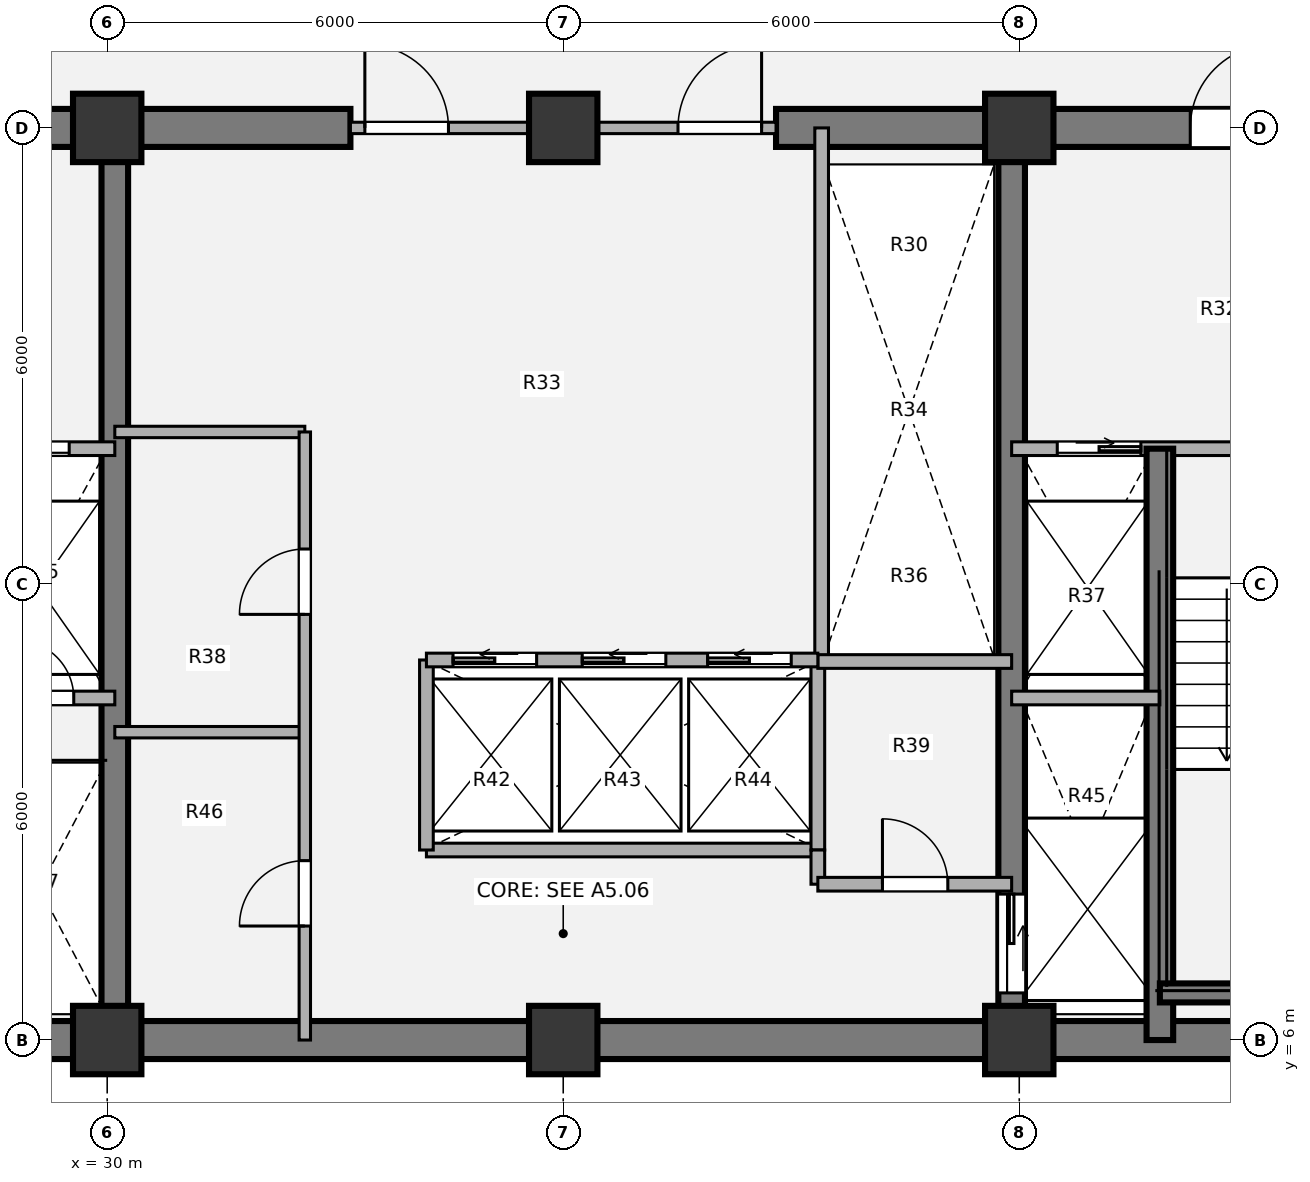
"""IFC4 building model, lengths in metres.
Left out: names, types, materials, properties, quantities, classifications, styles, units other than length and angle.
Written with IfcOpenShell. Run it as: python <this file> out.ifc"""

import sys

from ifc_helpers import new_model, si_unit, direction, frame, frame_2d, origin, origin_2d, place, context, subcontext, project, spatial, rectangle, extrude, source, transform, mapped, element, fill, save


model = new_model("IFC4")
c1 = context("Model", 3, precision=1e-05, world=origin(), true_north=direction((0.0, 1.0)))
c2 = subcontext(c1, "Body", "Model", "MODEL_VIEW")
j1 = project(units=[si_unit("LENGTHUNIT", "METRE"), si_unit("PLANEANGLEUNIT", "RADIAN")], contexts=[c1])
p1 = place(None, origin())
s1 = spatial("IfcSite", under=j1, at=p1, CompositionType="ELEMENT")
p2 = place(p1, origin())
s2 = spatial("IfcBuilding", under=s1, at=p2, CompositionType="ELEMENT")
p3 = place(p2, frame((0.0, 0.0, 135.18)))
s3 = spatial("IfcBuildingStorey", under=s2, at=p3, CompositionType="ELEMENT", Elevation=135.18)
m1 = source(origin(), c2, "Body", "SweptSolid", [
    extrude(rectangle(XDim=0.9, YDim=0.9, at=origin_2d()), origin(), (0.0, 0.0, 1.0), 3.78),
])
for number, where, z_axis, x_axis in (
    (1, (30.0, 6.0, 0.0), (0.0, 0.0, 1.0), (1.0, 0.0, 0.0)),
    (2, (36.0, 6.0, 0.0), (0.0, 0.0, 1.0), (1.0, 0.0, 0.0)),
    (3, (42.0, 6.0, 0.0), (0.0, 0.0, 1.0), (1.0, 0.0, 0.0)),
    (4, (30.0, 18.0, 0.0), (0.0, 0.0, 1.0), (1.0, 0.0, 0.0)),
    (5, (36.0, 18.0, 0.0), (0.0, 0.0, 1.0), (1.0, 0.0, 0.0)),
    (6, (42.0, 18.0, 0.0), (0.0, 0.0, 1.0), (1.0, 0.0, 0.0)),
):
    element("IfcColumn", number, at=place(p3, frame(where, z_axis=z_axis, x_axis=x_axis)), inside=s3, PredefinedType="COLUMN", context=c2, shape_type="MappedRepresentation", body=[
        mapped(m1, transform((0.0, 0.0, 0.0), x_axis=(1.0, 0.0, 0.0), y_axis=(0.0, 1.0, 0.0), z_axis=(0.0, 0.0, 1.0), scale=1.0)),
    ])
p4 = place(p3, frame((48.25, 6.0, 0.0), z_axis=(0.0, 0.0, 1.0), x_axis=(-1.0, 0.0, 0.0)))
e7 = element("IfcWall", 7, at=p4, inside=s3, PredefinedType="SHEAR", context=c2, shape_type="SweptSolid", body=[
    extrude(rectangle(XDim=24.5, YDim=0.5, at=frame_2d((12.25, 0.0))), origin(), (0.0, 0.0, 1.0), 3.78),
])
p5 = place(p3, frame((23.75, 18.0, 0.0), z_axis=(0.0, 0.0, 1.0), x_axis=(1.0, 0.0, 0.0)))
e8 = element("IfcWall", 8, at=p5, inside=s3, PredefinedType="SHEAR", context=c2, shape_type="SweptSolid", body=[
    extrude(rectangle(XDim=9.45, YDim=0.5, at=frame_2d((4.725, 0.0))), origin(), (0.0, 0.0, 1.0), 3.78),
])
p6 = place(p5, frame((2.95, 0.0, 0.0)))
e9 = element("IfcOpeningElement", 9, at=p6, cuts=e8, PredefinedType="OPENING", context=c2, shape_type="SweptSolid", body=[
    extrude(rectangle(XDim=1.1, YDim=2.1, at=origin_2d()), frame((0.55, 0.26, 1.05), z_axis=(0.0, -1.0, 0.0), x_axis=(1.0, 0.0, 0.0)), (0.0, 0.0, 1.0), 0.52),
])
p7 = place(p3, frame((38.8, 18.0, 0.0), z_axis=(0.0, 0.0, 1.0), x_axis=(1.0, 0.0, 0.0)))
e10 = element("IfcWall", 10, at=p7, inside=s3, PredefinedType="SHEAR", context=c2, shape_type="SweptSolid", body=[
    extrude(rectangle(XDim=9.45, YDim=0.5, at=frame_2d((4.725, 0.0))), origin(), (0.0, 0.0, 1.0), 3.78),
])
p8 = place(p7, frame((5.45, 0.0, 0.0)))
e11 = element("IfcOpeningElement", 11, at=p8, cuts=e10, PredefinedType="OPENING", context=c2, shape_type="SweptSolid", body=[
    extrude(rectangle(XDim=1.1, YDim=2.1, at=origin_2d()), frame((0.55, 0.26, 1.05), z_axis=(0.0, -1.0, 0.0), x_axis=(1.0, 0.0, 0.0)), (0.0, 0.0, 1.0), 0.52),
])
p9 = place(p3, frame((30.1, 6.0, 0.0), z_axis=(0.0, 0.0, 1.0), x_axis=(0.0, 1.0, 0.0)))
e12 = element("IfcWall", 12, at=p9, inside=s3, PredefinedType="SHEAR", context=c2, shape_type="SweptSolid", body=[
    extrude(rectangle(XDim=12.0, YDim=0.35, at=frame_2d((6.0, 0.0))), origin(), (0.0, 0.0, 1.0), 3.78),
])
p10 = place(p3, frame((41.9, 18.0, 0.0), z_axis=(0.0, 0.0, 1.0), x_axis=(0.0, -1.0, 0.0)))
e13 = element("IfcWall", 13, at=p10, inside=s3, PredefinedType="SHEAR", context=c2, shape_type="SweptSolid", body=[
    extrude(rectangle(XDim=12.0, YDim=0.35, at=frame_2d((6.0, 0.0))), origin(), (0.0, 0.0, 1.0), 3.78),
])
p11 = place(p10, frame((10.08, 0.0, 0.0)))
e14 = element("IfcOpeningElement", 14, at=p11, cuts=e13, PredefinedType="OPENING", context=c2, shape_type="SweptSolid", body=[
    extrude(rectangle(XDim=1.3, YDim=2.1, at=origin_2d()), frame((0.65, 0.185, 1.05), z_axis=(0.0, -1.0, 0.0), x_axis=(1.0, 0.0, 0.0)), (0.0, 0.0, 1.0), 0.37),
])
p12 = place(p3, frame((30.1, 14.0, 0.0), z_axis=(0.0, 0.0, 1.0), x_axis=(1.0, 0.0, 0.0)))
e15 = element("IfcWall", 15, at=p12, inside=s3, PredefinedType="PARTITIONING", context=c2, shape_type="SweptSolid", body=[
    extrude(rectangle(XDim=2.5, YDim=0.15, at=frame_2d((1.25, 0.0))), origin(), (0.0, 0.0, 1.0), 3.5),
])
p13 = place(p3, frame((34.2, 8.5, 0.0), z_axis=(0.0, 0.0, 1.0), x_axis=(1.0, 0.0, 0.0)))
e16 = element("IfcWall", 16, at=p13, inside=s3, PredefinedType="PARTITIONING", context=c2, shape_type="SweptSolid", body=[
    extrude(rectangle(XDim=5.15, YDim=0.18, at=frame_2d((2.575, 0.0))), origin(), (0.0, 0.0, 1.0), 3.5),
])
for number, where, z_axis, x_axis in (
    (17, (34.2, 8.5, 0.0), (0.0, 0.0, 1.0), (0.0, 1.0, 0.0)),
    (18, (39.35, 8.5, 0.0), (0.0, 0.0, 1.0), (0.0, 1.0, 0.0)),
):
    element("IfcWall", number, at=place(p3, frame(where, z_axis=z_axis, x_axis=x_axis)), inside=s3, PredefinedType="PARTITIONING", context=c2, shape_type="SweptSolid", body=[
        extrude(rectangle(XDim=2.5, YDim=0.18, at=frame_2d((1.25, 0.0))), origin(), (0.0, 0.0, 1.0), 3.5),
    ])
p14 = place(p3, frame((39.4, 11.0, 0.0), z_axis=(0.0, 0.0, 1.0), x_axis=(0.0, 1.0, 0.0)))
e19 = element("IfcWall", 19, at=p14, inside=s3, PredefinedType="PARTITIONING", context=c2, shape_type="SweptSolid", body=[
    extrude(rectangle(XDim=7.0, YDim=0.18, at=frame_2d((3.5, 0.0))), origin(), (0.0, 0.0, 1.0), 3.5),
])
p15 = place(p3, frame((30.1, 10.05, 0.0), z_axis=(0.0, 0.0, 1.0), x_axis=(1.0, 0.0, 0.0)))
e20 = element("IfcWall", 20, at=p15, inside=s3, PredefinedType="PARTITIONING", context=c2, shape_type="SweptSolid", body=[
    extrude(rectangle(XDim=2.5, YDim=0.15, at=frame_2d((1.25, 0.0))), origin(), (0.0, 0.0, 1.0), 3.5),
])
p16 = place(p3, frame((32.6, 6.0, 0.0), z_axis=(0.0, 0.0, 1.0), x_axis=(0.0, 1.0, 0.0)))
e21 = element("IfcWall", 21, at=p16, inside=s3, PredefinedType="PARTITIONING", context=c2, shape_type="SweptSolid", body=[
    extrude(rectangle(XDim=8.0, YDim=0.15, at=frame_2d((4.0, 0.0))), origin(), (0.0, 0.0, 1.0), 3.5),
])
p17 = place(p16, frame((1.5, 0.0, 0.0)))
e22 = element("IfcOpeningElement", 22, at=p17, cuts=e21, PredefinedType="OPENING", context=c2, shape_type="SweptSolid", body=[
    extrude(rectangle(XDim=0.86, YDim=2.1, at=origin_2d()), frame((0.43, 0.085, 1.05), z_axis=(0.0, -1.0, 0.0), x_axis=(1.0, 0.0, 0.0)), (0.0, 0.0, 1.0), 0.17),
])
p18 = place(p16, frame((5.6, 0.0, 0.0)))
e23 = element("IfcOpeningElement", 23, at=p18, cuts=e21, PredefinedType="OPENING", context=c2, shape_type="SweptSolid", body=[
    extrude(rectangle(XDim=0.86, YDim=2.1, at=origin_2d()), frame((0.43, 0.085, 1.05), z_axis=(0.0, -1.0, 0.0), x_axis=(1.0, 0.0, 0.0)), (0.0, 0.0, 1.0), 0.17),
])
p19 = place(p3, frame((39.35, 10.98, 0.0), z_axis=(0.0, 0.0, 1.0), x_axis=(1.0, 0.0, 0.0)))
e24 = element("IfcWall", 24, at=p19, inside=s3, PredefinedType="PARTITIONING", context=c2, shape_type="SweptSolid", body=[
    extrude(rectangle(XDim=2.55, YDim=0.18, at=frame_2d((1.275, 0.0))), origin(), (0.0, 0.0, 1.0), 3.5),
])
p20 = place(p3, frame((39.35, 8.05, 0.0), z_axis=(0.0, 0.0, 1.0), x_axis=(0.0, 1.0, 0.0)))
e25 = element("IfcWall", 25, at=p20, inside=s3, PredefinedType="PARTITIONING", context=c2, shape_type="SweptSolid", body=[
    extrude(rectangle(XDim=0.45, YDim=0.18, at=frame_2d((0.225, 0.0))), origin(), (0.0, 0.0, 1.0), 3.5),
])
p21 = place(p3, frame((39.35, 8.05, 0.0), z_axis=(0.0, 0.0, 1.0), x_axis=(1.0, 0.0, 0.0)))
e26 = element("IfcWall", 26, at=p21, inside=s3, PredefinedType="PARTITIONING", context=c2, shape_type="SweptSolid", body=[
    extrude(rectangle(XDim=2.55, YDim=0.18, at=frame_2d((1.275, 0.0))), origin(), (0.0, 0.0, 1.0), 3.5),
])
p22 = place(p21, frame((0.85, 0.0, 0.0)))
e27 = element("IfcOpeningElement", 27, at=p22, cuts=e26, PredefinedType="OPENING", context=c2, shape_type="SweptSolid", body=[
    extrude(rectangle(XDim=0.86, YDim=2.1, at=origin_2d()), frame((0.43, 0.1, 1.05), z_axis=(0.0, -1.0, 0.0), x_axis=(1.0, 0.0, 0.0)), (0.0, 0.0, 1.0), 0.2),
])
p23 = place(p3, frame((33.2, 18.0, 0.0), z_axis=(0.0, 0.0, 1.0), x_axis=(1.0, 0.0, 0.0)))
e28 = element("IfcWall", 28, at=p23, inside=s3, PredefinedType="PARTITIONING", context=c2, shape_type="SweptSolid", body=[
    extrude(rectangle(XDim=5.6, YDim=0.15, at=frame_2d((2.8, 0.0))), origin(), (0.0, 0.0, 1.0), 2.315),
])
p24 = place(p23, frame((0.19, 0.0, 0.0)))
e29 = element("IfcOpeningElement", 29, at=p24, cuts=e28, PredefinedType="OPENING", context=c2, shape_type="SweptSolid", body=[
    extrude(rectangle(XDim=1.1, YDim=2.1, at=origin_2d()), frame((0.55, 0.085, 1.05), z_axis=(0.0, -1.0, 0.0), x_axis=(1.0, 0.0, 0.0)), (0.0, 0.0, 1.0), 0.17),
])
p25 = place(p23, frame((4.31, 0.0, 0.0)))
e30 = element("IfcOpeningElement", 30, at=p25, cuts=e28, PredefinedType="OPENING", context=c2, shape_type="SweptSolid", body=[
    extrude(rectangle(XDim=1.1, YDim=2.1, at=origin_2d()), frame((0.55, 0.085, 1.05), z_axis=(0.0, -1.0, 0.0), x_axis=(1.0, 0.0, 0.0)), (0.0, 0.0, 1.0), 0.17),
])
p26 = place(p3, frame((24.0, 13.78, 0.0), z_axis=(0.0, 0.0, 1.0), x_axis=(1.0, 0.0, 0.0)))
e31 = element("IfcWall", 31, at=p26, inside=s3, PredefinedType="PARTITIONING", context=c2, shape_type="SweptSolid", body=[
    extrude(rectangle(XDim=6.1, YDim=0.18, at=frame_2d((3.05, 0.0))), origin(), (0.0, 0.0, 1.0), 3.5),
])
p27 = place(p26, frame((1.15, 0.0, 0.0)))
e32 = element("IfcOpeningElement", 32, at=p27, cuts=e31, PredefinedType="OPENING", context=c2, shape_type="SweptSolid", body=[
    extrude(rectangle(XDim=1.1, YDim=2.1, at=origin_2d()), frame((0.55, 0.1, 1.05), z_axis=(0.0, -1.0, 0.0), x_axis=(1.0, 0.0, 0.0)), (0.0, 0.0, 1.0), 0.2),
])
p28 = place(p26, frame((4.4, 0.0, 0.0)))
e33 = element("IfcOpeningElement", 33, at=p28, cuts=e31, PredefinedType="OPENING", context=c2, shape_type="SweptSolid", body=[
    extrude(rectangle(XDim=1.1, YDim=2.1, at=origin_2d()), frame((0.55, 0.1, 1.05), z_axis=(0.0, -1.0, 0.0), x_axis=(1.0, 0.0, 0.0)), (0.0, 0.0, 1.0), 0.2),
])
p29 = place(p3, frame((28.15, 10.5, 0.0), z_axis=(0.0, 0.0, 1.0), x_axis=(1.0, 0.0, 0.0)))
e34 = element("IfcWall", 34, at=p29, inside=s3, PredefinedType="PARTITIONING", context=c2, shape_type="SweptSolid", body=[
    extrude(rectangle(XDim=1.95, YDim=0.18, at=frame_2d((0.975, 0.0))), origin(), (0.0, 0.0, 1.0), 3.5),
])
p30 = place(p29, frame((0.65, 0.0, 0.0)))
e35 = element("IfcOpeningElement", 35, at=p30, cuts=e34, PredefinedType="OPENING", context=c2, shape_type="SweptSolid", body=[
    extrude(rectangle(XDim=0.76, YDim=2.05, at=origin_2d()), frame((0.38, 0.1, 1.025), z_axis=(0.0, -1.0, 0.0), x_axis=(1.0, 0.0, 0.0)), (0.0, 0.0, 1.0), 0.2),
])
p31 = place(p3, frame((41.9, 13.78, 0.0), z_axis=(0.0, 0.0, 1.0), x_axis=(1.0, 0.0, 0.0)))
e36 = element("IfcWall", 36, at=p31, inside=s3, PredefinedType="PARTITIONING", context=c2, shape_type="SweptSolid", body=[
    extrude(rectangle(XDim=6.1, YDim=0.18, at=frame_2d((3.05, 0.0))), origin(), (0.0, 0.0, 1.0), 3.5),
])
p32 = place(p31, frame((0.6, 0.0, 0.0)))
e37 = element("IfcOpeningElement", 37, at=p32, cuts=e36, PredefinedType="OPENING", context=c2, shape_type="SweptSolid", body=[
    extrude(rectangle(XDim=1.1, YDim=2.1, at=origin_2d()), frame((0.55, 0.1, 1.05), z_axis=(0.0, -1.0, 0.0), x_axis=(1.0, 0.0, 0.0)), (0.0, 0.0, 1.0), 0.2),
])
p33 = place(p31, frame((3.8, 0.0, 0.0)))
e38 = element("IfcOpeningElement", 38, at=p33, cuts=e36, PredefinedType="OPENING", context=c2, shape_type="SweptSolid", body=[
    extrude(rectangle(XDim=1.1, YDim=2.1, at=origin_2d()), frame((0.55, 0.1, 1.05), z_axis=(0.0, -1.0, 0.0), x_axis=(1.0, 0.0, 0.0)), (0.0, 0.0, 1.0), 0.2),
])
p34 = place(p3, frame((43.85, 6.0, 0.0), z_axis=(0.0, 0.0, 1.0), x_axis=(0.0, 1.0, 0.0)))
e39 = element("IfcWall", 39, at=p34, inside=s3, PredefinedType="SHEAR", context=c2, shape_type="SweptSolid", body=[
    extrude(rectangle(XDim=7.78, YDim=0.35, at=frame_2d((3.89, 0.0))), origin(), (0.0, 0.0, 1.0), 3.85),
])
p35 = place(p3, frame((43.85, 6.62, 0.0), z_axis=(0.0, 0.0, 1.0), x_axis=(1.0, 0.0, 0.0)))
e40 = element("IfcWall", 40, at=p35, inside=s3, PredefinedType="SHEAR", context=c2, shape_type="SweptSolid", body=[
    extrude(rectangle(XDim=3.57, YDim=0.25, at=frame_2d((1.785, 0.0))), origin(), (0.0, 0.0, 1.0), 3.85),
])
p36 = place(p3, frame((41.9, 10.5, 0.0), z_axis=(0.0, 0.0, 1.0), x_axis=(1.0, 0.0, 0.0)))
e41 = element("IfcWall", 41, at=p36, inside=s3, PredefinedType="PARTITIONING", context=c2, shape_type="SweptSolid", body=[
    extrude(rectangle(XDim=1.95, YDim=0.18, at=frame_2d((0.975, 0.0))), origin(), (0.0, 0.0, 1.0), 3.5),
])
p37 = place(p3, frame((34.2, 11.0, 0.0), z_axis=(0.0, 0.0, 1.0), x_axis=(1.0, 0.0, 0.0)))
e42 = element("IfcWall", 42, at=p37, inside=s3, PredefinedType="PARTITIONING", context=c2, shape_type="SweptSolid", body=[
    extrude(rectangle(XDim=5.15, YDim=0.18, at=frame_2d((2.575, 0.0))), origin(), (0.0, 0.0, 1.0), 3.5),
])
p38 = place(p37, frame((0.35, 0.0, 0.0)))
e43 = element("IfcOpeningElement", 43, at=p38, cuts=e42, PredefinedType="OPENING", context=c2, shape_type="SweptSolid", body=[
    extrude(rectangle(XDim=1.1, YDim=2.1, at=origin_2d()), frame((0.55, 0.1, 1.05), z_axis=(0.0, -1.0, 0.0), x_axis=(1.0, 0.0, 0.0)), (0.0, 0.0, 1.0), 0.2),
])
p39 = place(p37, frame((2.05, 0.0, 0.0)))
e44 = element("IfcOpeningElement", 44, at=p39, cuts=e42, PredefinedType="OPENING", context=c2, shape_type="SweptSolid", body=[
    extrude(rectangle(XDim=1.1, YDim=2.1, at=origin_2d()), frame((0.55, 0.1, 1.05), z_axis=(0.0, -1.0, 0.0), x_axis=(1.0, 0.0, 0.0)), (0.0, 0.0, 1.0), 0.2),
])
p40 = place(p37, frame((3.7, 0.0, 0.0)))
e45 = element("IfcOpeningElement", 45, at=p40, cuts=e42, PredefinedType="OPENING", context=c2, shape_type="SweptSolid", body=[
    extrude(rectangle(XDim=1.1, YDim=2.1, at=origin_2d()), frame((0.55, 0.1, 1.05), z_axis=(0.0, -1.0, 0.0), x_axis=(1.0, 0.0, 0.0)), (0.0, 0.0, 1.0), 0.2),
])
m2 = source(origin(), c2, "Body", "SweptSolid", [
    extrude(rectangle(XDim=0.86, YDim=2.1, at=origin_2d()), frame((0.43, 0.025, 1.05), z_axis=(0.0, -1.0, 0.0), x_axis=(1.0, 0.0, 0.0)), (0.0, 0.0, 1.0), 0.05),
])
p41 = place(p17, origin())
e46 = element("IfcDoor", 46, at=p41, inside=s3, OperationType="SINGLE_SWING_LEFT", PredefinedType="DOOR", context=c2, shape_type="MappedRepresentation", body=[
    mapped(m2, transform((0.0, 0.0, 0.0), x_axis=(1.0, 0.0, 0.0), y_axis=(0.0, 1.0, 0.0), z_axis=(0.0, 0.0, 1.0), scale=1.0)),
])
fill(e22, e46)
p42 = place(p18, origin())
e47 = element("IfcDoor", 47, at=p42, inside=s3, OperationType="SINGLE_SWING_LEFT", PredefinedType="DOOR", context=c2, shape_type="MappedRepresentation", body=[
    mapped(m2, transform((0.0, 0.0, 0.0), x_axis=(1.0, 0.0, 0.0), y_axis=(0.0, 1.0, 0.0), z_axis=(0.0, 0.0, 1.0), scale=1.0)),
])
fill(e23, e47)
p43 = place(p22, origin())
e48 = element("IfcDoor", 48, at=p43, inside=s3, OperationType="SINGLE_SWING_LEFT", PredefinedType="DOOR", context=c2, shape_type="MappedRepresentation", body=[
    mapped(m2, transform((0.0, 0.0, 0.0), x_axis=(1.0, 0.0, 0.0), y_axis=(0.0, 1.0, 0.0), z_axis=(0.0, 0.0, 1.0), scale=1.0)),
])
fill(e27, e48)
m3 = source(origin(), c2, "Body", "SweptSolid", [
    extrude(rectangle(XDim=1.1, YDim=2.1, at=origin_2d()), frame((0.55, 0.025, 1.05), z_axis=(0.0, -1.0, 0.0), x_axis=(1.0, 0.0, 0.0)), (0.0, 0.0, 1.0), 0.05),
])
p44 = place(p24, origin())
e49 = element("IfcDoor", 49, at=p44, inside=s3, OperationType="SINGLE_SWING_LEFT", PredefinedType="DOOR", context=c2, shape_type="MappedRepresentation", body=[
    mapped(m3, transform((0.0, 0.0, 0.0), x_axis=(1.0, 0.0, 0.0), y_axis=(0.0, 1.0, 0.0), z_axis=(0.0, 0.0, 1.0), scale=1.0)),
])
fill(e29, e49)
p45 = place(p25, origin())
e50 = element("IfcDoor", 50, at=p45, inside=s3, OperationType="SINGLE_SWING_RIGHT", PredefinedType="DOOR", context=c2, shape_type="MappedRepresentation", body=[
    mapped(m3, transform((0.0, 0.0, 0.0), x_axis=(1.0, 0.0, 0.0), y_axis=(0.0, 1.0, 0.0), z_axis=(0.0, 0.0, 1.0), scale=1.0)),
])
fill(e30, e50)
m4 = source(origin(), c2, "Body", "SweptSolid", [
    extrude(rectangle(XDim=1.1, YDim=2.1, at=origin_2d()), frame((0.55, 0.025, 1.05), z_axis=(0.0, -1.0, 0.0), x_axis=(1.0, 0.0, 0.0)), (0.0, 0.0, 1.0), 0.05),
])
p46 = place(p28, origin())
e51 = element("IfcDoor", 51, at=p46, inside=s3, OperationType="SLIDING_TO_LEFT", PredefinedType="DOOR", context=c2, shape_type="MappedRepresentation", body=[
    mapped(m4, transform((0.0, 0.0, 0.0), x_axis=(1.0, 0.0, 0.0), y_axis=(0.0, 1.0, 0.0), z_axis=(0.0, 0.0, 1.0), scale=1.0)),
])
fill(e33, e51)
m5 = source(origin(), c2, "Body", "SweptSolid", [
    extrude(rectangle(XDim=0.76, YDim=2.05, at=origin_2d()), frame((0.38, 0.025, 1.025), z_axis=(0.0, -1.0, 0.0), x_axis=(1.0, 0.0, 0.0)), (0.0, 0.0, 1.0), 0.05),
])
p47 = place(p30, origin())
e52 = element("IfcDoor", 52, at=p47, inside=s3, OperationType="SINGLE_SWING_LEFT", PredefinedType="DOOR", context=c2, shape_type="MappedRepresentation", body=[
    mapped(m5, transform((0.0, 0.0, 0.0), x_axis=(1.0, 0.0, 0.0), y_axis=(0.0, 1.0, 0.0), z_axis=(0.0, 0.0, 1.0), scale=1.0)),
])
fill(e35, e52)
p48 = place(p32, origin())
e53 = element("IfcDoor", 53, at=p48, inside=s3, OperationType="SLIDING_TO_RIGHT", PredefinedType="DOOR", context=c2, shape_type="MappedRepresentation", body=[
    mapped(m4, transform((0.0, 0.0, 0.0), x_axis=(1.0, 0.0, 0.0), y_axis=(0.0, 1.0, 0.0), z_axis=(0.0, 0.0, 1.0), scale=1.0)),
])
fill(e37, e53)
m6 = source(origin(), c2, "Body", "SweptSolid", [
    extrude(rectangle(XDim=1.3, YDim=2.1, at=origin_2d()), frame((0.65, 0.025, 1.05), z_axis=(0.0, -1.0, 0.0), x_axis=(1.0, 0.0, 0.0)), (0.0, 0.0, 1.0), 0.05),
])
p49 = place(p11, origin())
e54 = element("IfcDoor", 54, at=p49, inside=s3, OperationType="SLIDING_TO_LEFT", PredefinedType="DOOR", context=c2, shape_type="MappedRepresentation", body=[
    mapped(m6, transform((0.0, 0.0, 0.0), x_axis=(1.0, 0.0, 0.0), y_axis=(0.0, 1.0, 0.0), z_axis=(0.0, 0.0, 1.0), scale=1.0)),
])
fill(e14, e54)
p50 = place(p8, origin())
e55 = element("IfcDoor", 55, at=p50, inside=s3, OperationType="SINGLE_SWING_RIGHT", PredefinedType="DOOR", context=c2, shape_type="MappedRepresentation", body=[
    mapped(m3, transform((0.0, 0.0, 0.0), x_axis=(1.0, 0.0, 0.0), y_axis=(0.0, 1.0, 0.0), z_axis=(0.0, 0.0, 1.0), scale=1.0)),
])
fill(e11, e55)
p51 = place(p38, origin())
e56 = element("IfcDoor", 56, at=p51, inside=s3, OperationType="SLIDING_TO_LEFT", PredefinedType="DOOR", context=c2, shape_type="MappedRepresentation", body=[
    mapped(m4, transform((0.0, 0.0, 0.0), x_axis=(1.0, 0.0, 0.0), y_axis=(0.0, 1.0, 0.0), z_axis=(0.0, 0.0, 1.0), scale=1.0)),
])
fill(e43, e56)
p52 = place(p39, origin())
e57 = element("IfcDoor", 57, at=p52, inside=s3, OperationType="SLIDING_TO_LEFT", PredefinedType="DOOR", context=c2, shape_type="MappedRepresentation", body=[
    mapped(m4, transform((0.0, 0.0, 0.0), x_axis=(1.0, 0.0, 0.0), y_axis=(0.0, 1.0, 0.0), z_axis=(0.0, 0.0, 1.0), scale=1.0)),
])
fill(e44, e57)
p53 = place(p40, origin())
e58 = element("IfcDoor", 58, at=p53, inside=s3, OperationType="SLIDING_TO_LEFT", PredefinedType="DOOR", context=c2, shape_type="MappedRepresentation", body=[
    mapped(m4, transform((0.0, 0.0, 0.0), x_axis=(1.0, 0.0, 0.0), y_axis=(0.0, 1.0, 0.0), z_axis=(0.0, 0.0, 1.0), scale=1.0)),
])
fill(e45, e58)
save(model, sys.argv[1])
